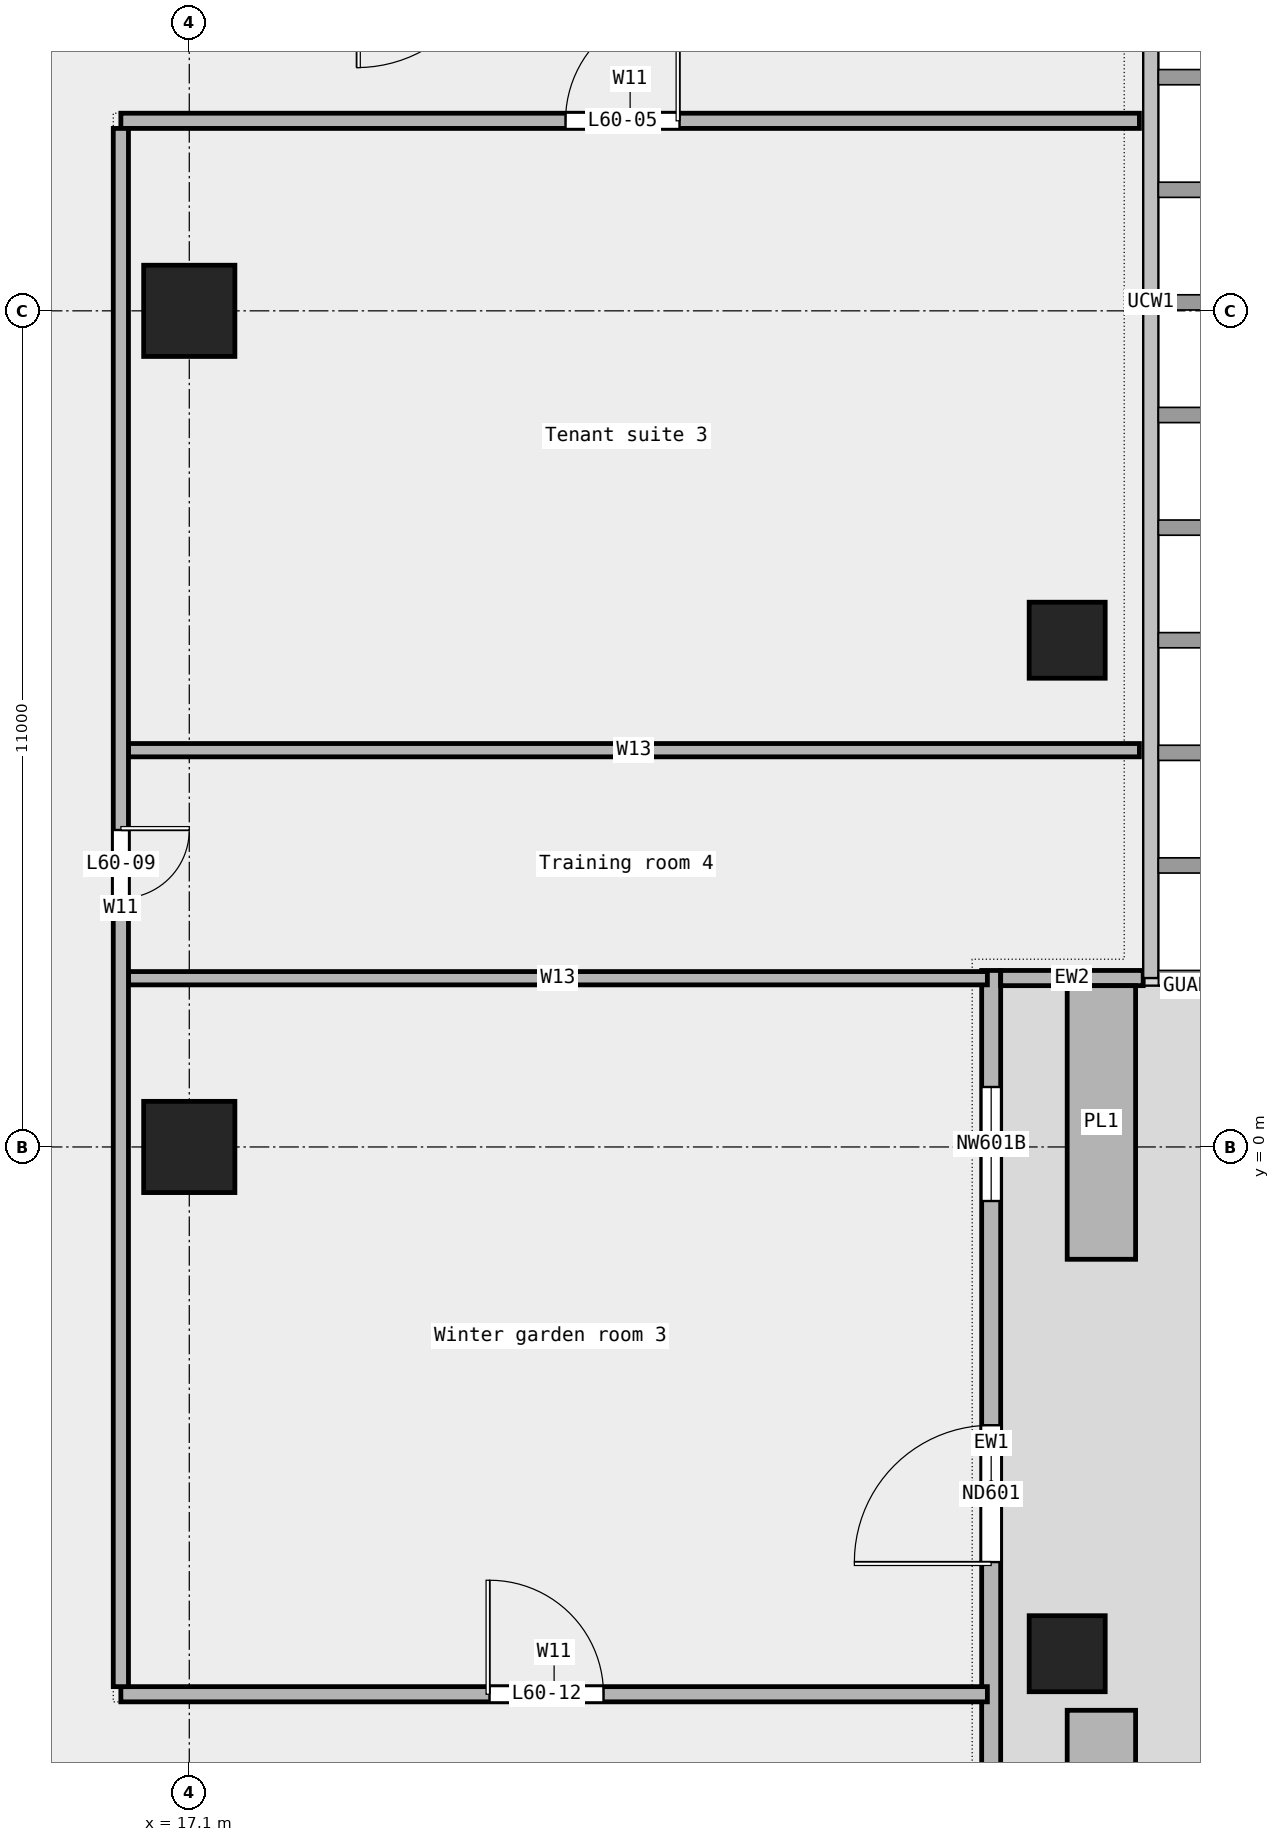
"""IFC4 building model, lengths in metres.
Left out: names, types, materials, properties, quantities, classifications, styles, units other than length and angle.
Written with IfcOpenShell. Run it as: python <this file> out.ifc"""

import sys

from ifc_helpers import new_model, si_unit, direction, frame, frame_2d, origin, origin_2d, place, context, subcontext, project, spatial, rectangle, extrude, element, fill, save


model = new_model("IFC4")
c1 = context("Model", 3, precision=1e-05, world=origin(), true_north=direction((0.0, 1.0)))
c2 = subcontext(c1, "Body", "Model", "MODEL_VIEW")
j1 = project(units=[si_unit("LENGTHUNIT", "METRE"), si_unit("PLANEANGLEUNIT", "RADIAN")], contexts=[c1])
p1 = place(None, origin())
s1 = spatial("IfcSite", under=j1, at=p1, CompositionType="ELEMENT")
p2 = place(p1, origin())
s2 = spatial("IfcBuilding", under=s1, at=p2, CompositionType="ELEMENT")
p3 = place(p2, frame((0.0, 0.0, 279.4)))
s3 = spatial("IfcBuildingStorey", under=s2, at=p3, CompositionType="ELEMENT", Elevation=279.4)
for number, where, z_axis, x_axis in (
    (1, (28.65, -6.667, 0.0), (0.0, 0.0, 1.0), (1.0, 0.0, 0.0)),
    (2, (28.65, 6.667, 0.0), (0.0, 0.0, 1.0), (1.0, 0.0, 0.0)),
):
    element("IfcColumn", number, at=place(p3, frame(where, z_axis=z_axis, x_axis=x_axis)), inside=s3, PredefinedType="COLUMN", context=c2, shape_type="SweptSolid", body=[
        extrude(rectangle(XDim=1.0, YDim=1.0, at=origin_2d()), origin(), (0.0, 0.0, 1.0), 3.6),
    ])
for number, where, z_axis, x_axis in (
    (3, (17.1, 0.0, 0.0), (0.0, 0.0, 1.0), (1.0, 0.0, 0.0)),
    (4, (17.1, 11.0, 0.0), (0.0, 0.0, 1.0), (1.0, 0.0, 0.0)),
):
    element("IfcColumn", number, at=place(p3, frame(where, z_axis=z_axis, x_axis=x_axis)), inside=s3, PredefinedType="COLUMN", context=c2, shape_type="SweptSolid", body=[
        extrude(rectangle(XDim=1.2, YDim=1.2, at=origin_2d()), origin(), (0.0, 0.0, 1.0), 3.6),
    ])
p4 = place(p3, frame((27.65, -11.211, 0.0), z_axis=(0.0, 0.0, 1.0), x_axis=(0.0, 1.0, 0.0)))
e5 = element("IfcWall", 5, at=p4, inside=s3, PredefinedType="STANDARD", context=c2, shape_type="SweptSolid", body=[
    extrude(rectangle(XDim=13.533, YDim=0.25, at=frame_2d((6.767, 0.0))), origin(), (0.0, 0.0, 1.0), 3.6),
])
p5 = place(p4, frame((1.5, 0.0, 0.45)))
e6 = element("IfcOpeningElement", 6, at=p5, cuts=e5, PredefinedType="OPENING", context=c2, shape_type="SweptSolid", body=[
    extrude(rectangle(XDim=1.5, YDim=2.4, at=frame_2d((0.75, 1.2))), frame((0.0, 0.137, 0.0), z_axis=(0.0, -1.0, 0.0), x_axis=(1.0, 0.0, 0.0)), (0.0, 0.0, 1.0), 0.274),
])
p6 = place(p4, frame((5.75, 0.0, 0.0)))
e7 = element("IfcOpeningElement", 7, at=p6, cuts=e5, PredefinedType="OPENING", context=c2, shape_type="SweptSolid", body=[
    extrude(rectangle(XDim=1.8, YDim=2.4, at=frame_2d((0.9, 1.2))), frame((0.0, 0.137, 0.0), z_axis=(0.0, -1.0, 0.0), x_axis=(1.0, 0.0, 0.0)), (0.0, 0.0, 1.0), 0.274),
])
p7 = place(p4, frame((10.5, 0.0, 0.45)))
e8 = element("IfcOpeningElement", 8, at=p7, cuts=e5, PredefinedType="OPENING", context=c2, shape_type="SweptSolid", body=[
    extrude(rectangle(XDim=1.5, YDim=2.4, at=frame_2d((0.75, 1.2))), frame((0.0, 0.137, 0.0), z_axis=(0.0, -1.0, 0.0), x_axis=(1.0, 0.0, 0.0)), (0.0, 0.0, 1.0), 0.274),
])
p8 = place(p3, frame((29.65, 2.222, 0.0), z_axis=(0.0, 0.0, 1.0), x_axis=(-1.0, 0.0, 0.0)))
e9 = element("IfcWall", 9, at=p8, inside=s3, PredefinedType="STANDARD", context=c2, shape_type="SweptSolid", body=[
    extrude(rectangle(XDim=1.875, YDim=0.2, at=frame_2d((0.938, 0.0))), origin(), (0.0, 0.0, 1.0), 3.6),
])
for number, where, z_axis, x_axis in (
    (10, (29.1, -11.011, 0.0), (0.0, 0.0, 1.0), (0.0, 1.0, 0.0)),
    (11, (29.1, -1.478, 0.0), (0.0, 0.0, 1.0), (0.0, 1.0, 0.0)),
):
    element("IfcWall", number, at=place(p3, frame(where, z_axis=z_axis, x_axis=x_axis)), inside=s3, PredefinedType="STANDARD", context=c2, shape_type="SweptSolid", body=[
        extrude(rectangle(XDim=3.6, YDim=0.9, at=frame_2d((1.8, 0.0))), origin(), (0.0, 0.0, 1.0), 0.7),
    ])
p9 = place(p3, frame((16.2, -7.2, 0.0), z_axis=(0.0, 0.0, 1.0), x_axis=(1.0, 0.0, 0.0)))
e12 = element("IfcWall", 12, at=p9, inside=s3, PredefinedType="PARTITIONING", context=c2, shape_type="SweptSolid", body=[
    extrude(rectangle(XDim=11.4, YDim=0.2, at=frame_2d((5.7, 0.0))), origin(), (0.0, 0.0, 1.0), 3.6),
])
p10 = place(p9, frame((4.85, 0.0, 0.0)))
e13 = element("IfcOpeningElement", 13, at=p10, cuts=e12, PredefinedType="OPENING", context=c2, shape_type="SweptSolid", body=[
    extrude(rectangle(XDim=1.5, YDim=2.1, at=frame_2d((0.75, 1.05))), frame((0.0, 0.112, 0.0), z_axis=(0.0, -1.0, 0.0), x_axis=(1.0, 0.0, 0.0)), (0.0, 0.0, 1.0), 0.224),
])
p11 = place(p3, frame((16.3, 2.22, 0.0), z_axis=(0.0, 0.0, 1.0), x_axis=(1.0, 0.0, 0.0)))
e14 = element("IfcWall", 14, at=p11, inside=s3, PredefinedType="PARTITIONING", context=c2, shape_type="SweptSolid", body=[
    extrude(rectangle(XDim=11.3, YDim=0.175, at=frame_2d((5.65, 0.0))), origin(), (0.0, 0.0, 1.0), 3.6),
])
p12 = place(p3, frame((16.3, 5.22, 0.0), z_axis=(0.0, 0.0, 1.0), x_axis=(1.0, 0.0, 0.0)))
e15 = element("IfcWall", 15, at=p12, inside=s3, PredefinedType="PARTITIONING", context=c2, shape_type="SweptSolid", body=[
    extrude(rectangle(XDim=13.3, YDim=0.175, at=frame_2d((6.65, 0.0))), origin(), (0.0, 0.0, 1.0), 3.6),
])
p13 = place(p3, frame((16.2, 13.5, 0.0), z_axis=(0.0, 0.0, 1.0), x_axis=(1.0, 0.0, 0.0)))
e16 = element("IfcWall", 16, at=p13, inside=s3, PredefinedType="PARTITIONING", context=c2, shape_type="SweptSolid", body=[
    extrude(rectangle(XDim=13.4, YDim=0.2, at=frame_2d((6.7, 0.0))), origin(), (0.0, 0.0, 1.0), 3.6),
])
p14 = place(p13, frame((5.85, 0.0, 0.0)))
e17 = element("IfcOpeningElement", 17, at=p14, cuts=e16, PredefinedType="OPENING", context=c2, shape_type="SweptSolid", body=[
    extrude(rectangle(XDim=1.5, YDim=2.1, at=frame_2d((0.75, 1.05))), frame((0.0, 0.112, 0.0), z_axis=(0.0, -1.0, 0.0), x_axis=(1.0, 0.0, 0.0)), (0.0, 0.0, 1.0), 0.224),
])
p15 = place(p3, frame((16.2, -7.1, 0.0), z_axis=(0.0, 0.0, 1.0), x_axis=(0.0, 1.0, 0.0)))
e18 = element("IfcWall", 18, at=p15, inside=s3, PredefinedType="PARTITIONING", context=c2, shape_type="SweptSolid", body=[
    extrude(rectangle(XDim=20.5, YDim=0.2, at=frame_2d((10.25, 0.0))), origin(), (0.0, 0.0, 1.0), 3.6),
])
p16 = place(p15, frame((10.37, 0.0, 0.0)))
e19 = element("IfcOpeningElement", 19, at=p16, cuts=e18, PredefinedType="OPENING", context=c2, shape_type="SweptSolid", body=[
    extrude(rectangle(XDim=0.9, YDim=2.1, at=frame_2d((0.45, 1.05))), frame((0.0, 0.112, 0.0), z_axis=(0.0, -1.0, 0.0), x_axis=(1.0, 0.0, 0.0)), (0.0, 0.0, 1.0), 0.224),
])
p17 = place(p6, origin())
e20 = element("IfcDoor", 20, at=p17, inside=s3, OperationType="DOUBLE_DOOR_SINGLE_SWING", PredefinedType="DOOR", context=c2, shape_type="SweptSolid", body=[
    extrude(rectangle(XDim=1.8, YDim=2.4, at=frame_2d((0.9, 1.2))), frame((0.0, 0.025, 0.0), z_axis=(0.0, -1.0, 0.0), x_axis=(1.0, 0.0, 0.0)), (0.0, 0.0, 1.0), 0.05),
])
fill(e7, e20)
p18 = place(p7, origin())
e21 = element("IfcWindow", 21, at=p18, inside=s3, PartitioningType="SINGLE_PANEL", PredefinedType="WINDOW", context=c2, shape_type="SweptSolid", body=[
    extrude(rectangle(XDim=1.5, YDim=2.4, at=frame_2d((0.75, 1.2))), frame((0.0, 0.03, 0.0), z_axis=(0.0, -1.0, 0.0), x_axis=(1.0, 0.0, 0.0)), (0.0, 0.0, 1.0), 0.06),
])
fill(e8, e21)
p19 = place(p14, origin())
e22 = element("IfcDoor", 22, at=p19, inside=s3, OperationType="DOUBLE_DOOR_SINGLE_SWING", PredefinedType="DOOR", context=c2, shape_type="SweptSolid", body=[
    extrude(rectangle(XDim=1.5, YDim=2.1, at=frame_2d((0.75, 1.05))), frame((0.0, 0.025, 0.0), z_axis=(0.0, -1.0, 0.0), x_axis=(1.0, 0.0, 0.0)), (0.0, 0.0, 1.0), 0.05),
])
fill(e17, e22)
p20 = place(p16, origin())
e23 = element("IfcDoor", 23, at=p20, inside=s3, OperationType="SINGLE_SWING_LEFT", PredefinedType="DOOR", context=c2, shape_type="SweptSolid", body=[
    extrude(rectangle(XDim=0.9, YDim=2.1, at=frame_2d((0.45, 1.05))), frame((0.0, 0.025, 0.0), z_axis=(0.0, -1.0, 0.0), x_axis=(1.0, 0.0, 0.0)), (0.0, 0.0, 1.0), 0.05),
])
fill(e19, e23)
p21 = place(p10, origin())
e24 = element("IfcDoor", 24, at=p21, inside=s3, OperationType="DOUBLE_DOOR_SINGLE_SWING", PredefinedType="DOOR", context=c2, shape_type="SweptSolid", body=[
    extrude(rectangle(XDim=1.5, YDim=2.1, at=frame_2d((0.75, 1.05))), frame((0.0, 0.025, 0.0), z_axis=(0.0, -1.0, 0.0), x_axis=(1.0, 0.0, 0.0)), (0.0, 0.0, 1.0), 0.05),
])
fill(e13, e24)
save(model, sys.argv[1])
